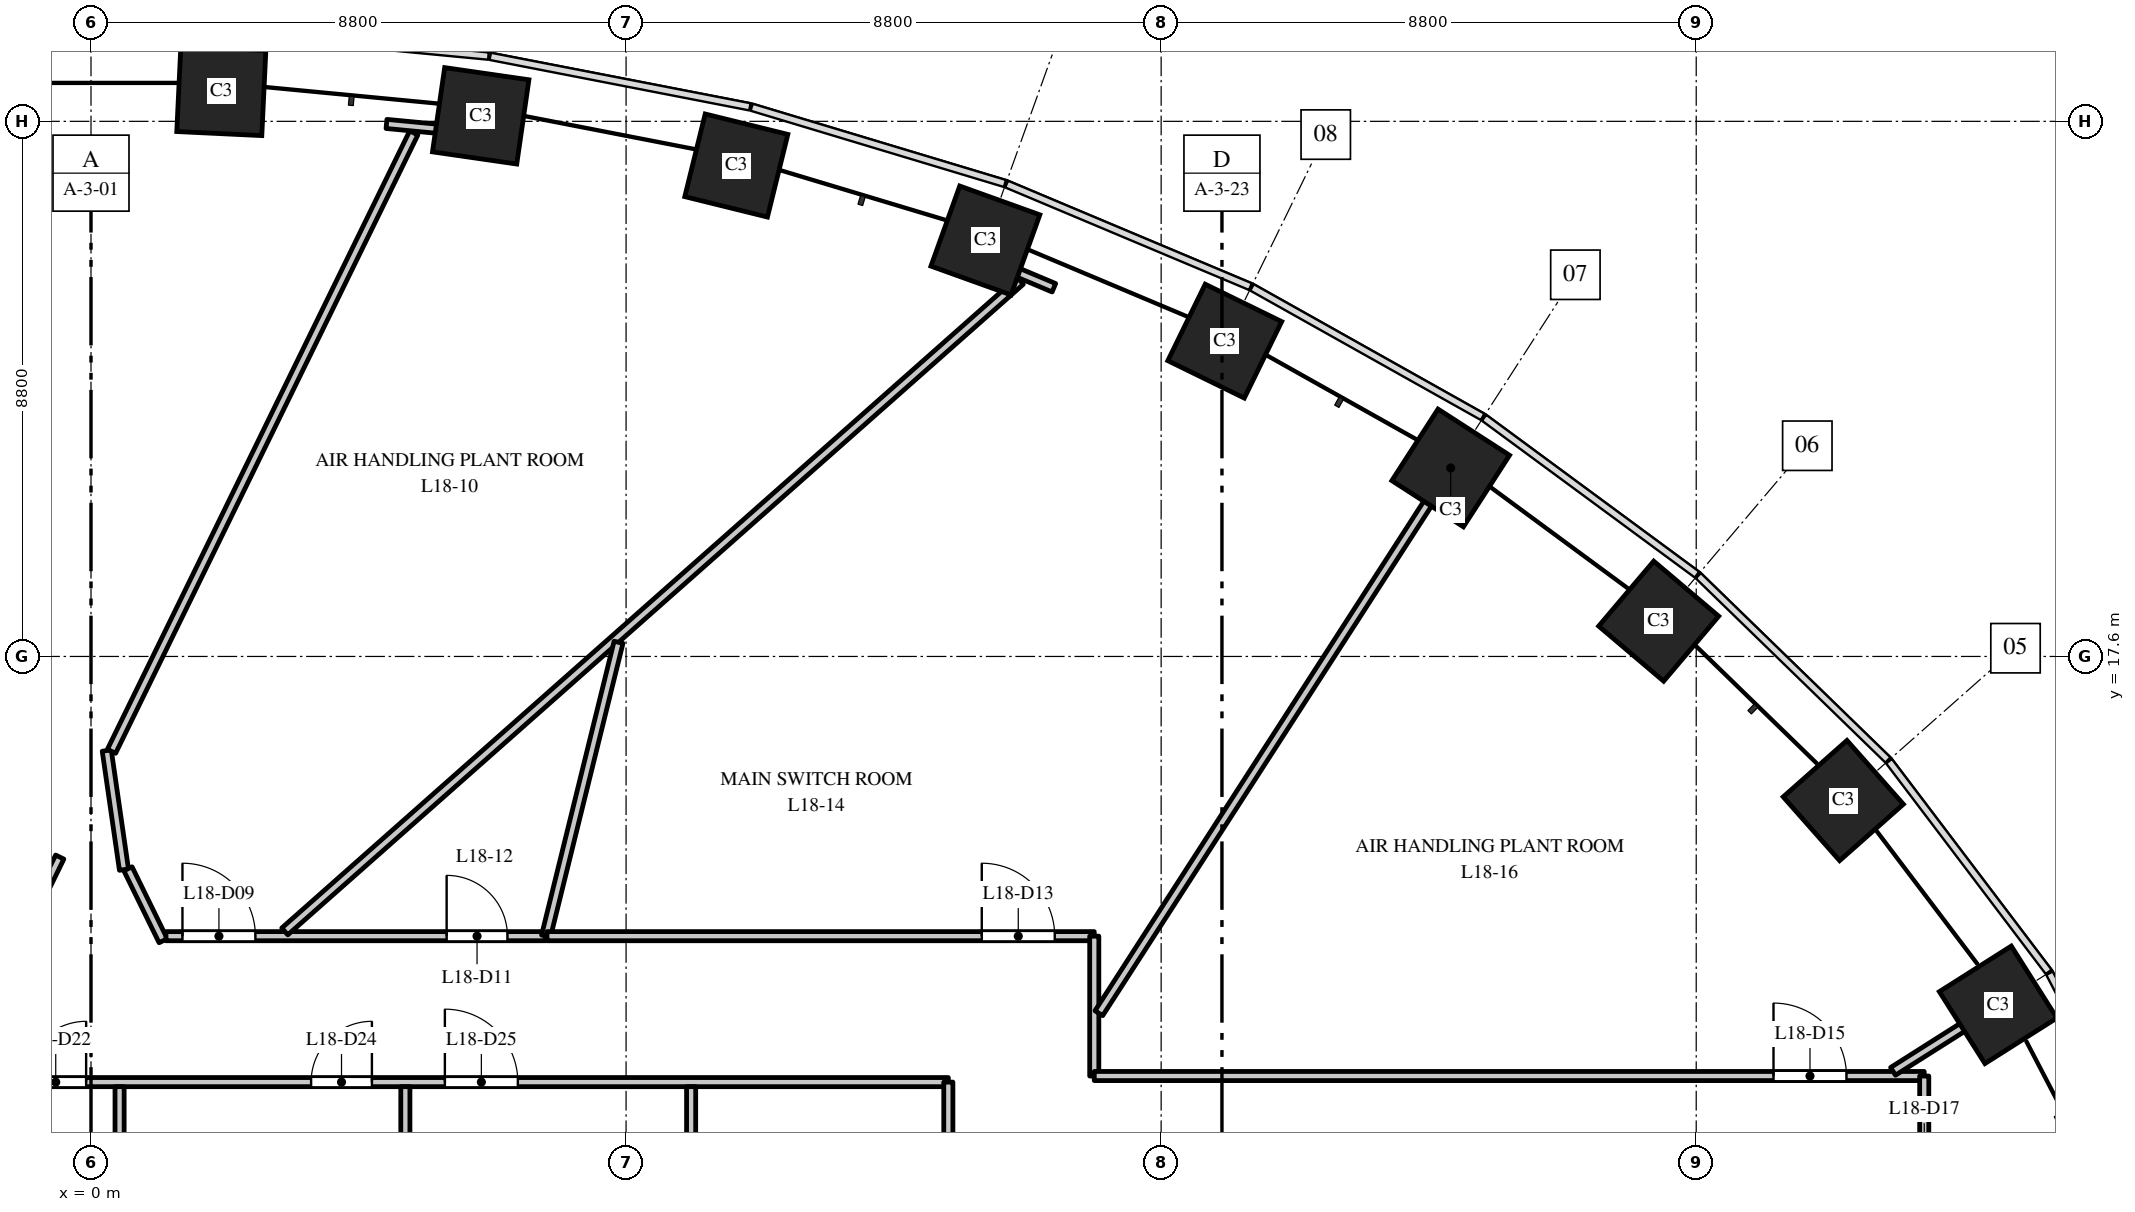
"""IFC4 building model, lengths in metres.
Left out: names, types, materials, properties, quantities, classifications, styles, units other than length and angle.
Written with IfcOpenShell. Run it as: python <this file> out.ifc"""

import sys

from ifc_helpers import new_model, si_unit, direction, frame, frame_2d, origin, origin_2d, place, context, subcontext, project, spatial, rectangle, extrude, element, fill, save


model = new_model("IFC4")
c1 = context("Model", 3, precision=1e-05, world=origin(), true_north=direction((0.0, 1.0)))
c2 = subcontext(c1, "Body", "Model", "MODEL_VIEW")
j1 = project(units=[si_unit("LENGTHUNIT", "METRE"), si_unit("PLANEANGLEUNIT", "RADIAN")], contexts=[c1])
p1 = place(None, origin())
s1 = spatial("IfcSite", under=j1, at=p1, CompositionType="ELEMENT")
p2 = place(p1, origin())
s2 = spatial("IfcBuilding", under=s1, at=p2, CompositionType="ELEMENT")
p3 = place(p2, frame((0.0, 0.0, 82.5)))
s3 = spatial("IfcBuildingStorey", under=s2, at=p3, CompositionType="ELEMENT", Elevation=82.5)
for number, where, z_axis, x_axis in (
    (1, (31.365, 11.871, 0.0), (0.0, 0.0, 1.0), (-0.535, 0.845, 0.0)),
    (2, (28.819, 15.23, 0.0), (0.0, 0.0, 1.0), (-0.663, 0.749, 0.0)),
    (3, (25.783, 18.18, 0.0), (0.0, 0.0, 1.0), (-0.763, 0.646, 0.0)),
    (4, (22.362, 20.7, 0.0), (0.0, 0.0, 1.0), (-0.84, 0.542, 0.0)),
    (5, (18.646, 22.785, 0.0), (0.0, 0.0, 1.0), (-0.898, 0.439, 0.0)),
    (6, (14.709, 24.441, 0.0), (0.0, 0.0, 1.0), (-0.941, 0.338, 0.0)),
    (7, (10.613, 25.674, 0.0), (0.0, 0.0, 1.0), (-0.971, 0.24, 0.0)),
    (8, (6.409, 26.491, 0.0), (0.0, 0.0, 1.0), (-0.99, 0.143, 0.0)),
    (9, (2.143, 26.898, 0.0), (0.0, 0.0, 1.0), (-0.999, 0.048, 0.0)),
):
    element("IfcColumn", number, at=place(p3, frame(where, z_axis=z_axis, x_axis=x_axis)), inside=s3, PredefinedType="COLUMN", context=c2, shape_type="SweptSolid", body=[
        extrude(rectangle(XDim=1.4, YDim=1.4, at=origin_2d()), origin(), (0.0, 0.0, 1.0), 5.5),
    ])
p4 = place(p3, frame((-14.1, 10.6, 0.0), z_axis=(0.0, 0.0, 1.0), x_axis=(1.0, 0.0, 0.0)))
e10 = element("IfcWall", 10, at=p4, inside=s3, PredefinedType="PARTITIONING", context=c2, shape_type="SweptSolid", body=[
    extrude(rectangle(XDim=28.2, YDim=0.15, at=frame_2d((14.1, 0.0))), origin(), (0.0, 0.0, 1.0), 4.35),
])
p5 = place(p4, frame((8.32, 0.0, 0.0)))
e11 = element("IfcOpeningElement", 11, at=p5, cuts=e10, PredefinedType="OPENING", context=c2, shape_type="SweptSolid", body=[
    extrude(rectangle(XDim=1.0, YDim=2.1, at=frame_2d((0.5, 1.05))), frame((0.0, 0.085, 0.0), z_axis=(0.0, -1.0, 0.0), x_axis=(1.0, 0.0, 0.0)), (0.0, 0.0, 1.0), 0.17),
])
p6 = place(p4, frame((13.02, 0.0, 0.0)))
e12 = element("IfcOpeningElement", 12, at=p6, cuts=e10, PredefinedType="OPENING", context=c2, shape_type="SweptSolid", body=[
    extrude(rectangle(XDim=1.0, YDim=2.1, at=frame_2d((0.5, 1.05))), frame((0.0, 0.085, 0.0), z_axis=(0.0, -1.0, 0.0), x_axis=(1.0, 0.0, 0.0)), (0.0, 0.0, 1.0), 0.17),
])
p7 = place(p4, frame((17.72, 0.0, 0.0)))
e13 = element("IfcOpeningElement", 13, at=p7, cuts=e10, PredefinedType="OPENING", context=c2, shape_type="SweptSolid", body=[
    extrude(rectangle(XDim=1.0, YDim=2.1, at=frame_2d((0.5, 1.05))), frame((0.0, 0.085, 0.0), z_axis=(0.0, -1.0, 0.0), x_axis=(1.0, 0.0, 0.0)), (0.0, 0.0, 1.0), 0.17),
])
p8 = place(p4, frame((19.92, 0.0, 0.0)))
e14 = element("IfcOpeningElement", 14, at=p8, cuts=e10, PredefinedType="OPENING", context=c2, shape_type="SweptSolid", body=[
    extrude(rectangle(XDim=1.2, YDim=2.1, at=frame_2d((0.6, 1.05))), frame((0.0, 0.085, 0.0), z_axis=(0.0, -1.0, 0.0), x_axis=(1.0, 0.0, 0.0)), (0.0, 0.0, 1.0), 0.17),
])
p9 = place(p3, frame((-1.113, 13.075, 0.0), z_axis=(0.0, 0.0, 1.0), x_axis=(0.439036850384, 0.898469055675, 0.0)))
e15 = element("IfcWall", 15, at=p9, inside=s3, PredefinedType="PARTITIONING", context=c2, shape_type="SweptSolid", body=[
    extrude(rectangle(XDim=1.365, YDim=0.15, at=frame_2d((0.682, 0.0))), origin(), (0.0, 0.0, 1.0), 4.35),
])
p10 = place(p3, frame((0.259, 16.052, 0.0), z_axis=(0.0, 0.0, 1.0), x_axis=(0.143027920195, -0.989718653984, 0.0)))
e16 = element("IfcWall", 16, at=p10, inside=s3, PredefinedType="PARTITIONING", context=c2, shape_type="SweptSolid", body=[
    extrude(rectangle(XDim=1.978, YDim=0.15, at=frame_2d((0.989, 0.0))), origin(), (0.0, 0.0, 1.0), 5.2),
])
p11 = place(p3, frame((0.337, 16.04, 0.0), z_axis=(0.0, 0.0, 1.0), x_axis=(0.439198527349, 0.898390034214, 0.0)))
e17 = element("IfcWall", 17, at=p11, inside=s3, PredefinedType="PARTITIONING", context=c2, shape_type="SweptSolid", body=[
    extrude(rectangle(XDim=11.32, YDim=0.15, at=frame_2d((5.66, 0.0))), origin(), (0.0, 0.0, 1.0), 4.4),
])
p12 = place(p3, frame((0.47, 7.469, 0.0), z_axis=(0.0, 0.0, 1.0), x_axis=(0.0, 1.0, 0.0)))
e18 = element("IfcWall", 18, at=p12, inside=s3, PredefinedType="PARTITIONING", context=c2, shape_type="SweptSolid", body=[
    extrude(rectangle(XDim=3.056, YDim=0.15, at=frame_2d((1.528, 0.0))), origin(), (0.0, 0.0, 1.0), 4.4),
])
p13 = place(p3, frame((0.608, 14.108, 0.0), z_axis=(0.0, 0.0, 1.0), x_axis=(0.439708780633, -0.898140405635, 0.0)))
e19 = element("IfcWall", 19, at=p13, inside=s3, PredefinedType="PARTITIONING", context=c2, shape_type="SweptSolid", body=[
    extrude(rectangle(XDim=1.317, YDim=0.15, at=frame_2d((0.658, 0.0))), origin(), (0.0, 0.0, 1.0), 5.2),
])
p14 = place(p3, frame((1.233, 13.0, 0.0), z_axis=(0.0, 0.0, 1.0), x_axis=(1.0, 0.0, 0.0)))
e20 = element("IfcWall", 20, at=p14, inside=s3, PredefinedType="PARTITIONING", context=c2, shape_type="SweptSolid", body=[
    extrude(rectangle(XDim=6.25, YDim=0.15, at=frame_2d((3.125, 0.0))), origin(), (0.0, 0.0, 1.0), 4.35),
])
p15 = place(p14, frame((0.271, 0.0, 0.0)))
e21 = element("IfcOpeningElement", 21, at=p15, cuts=e20, PredefinedType="OPENING", context=c2, shape_type="SweptSolid", body=[
    extrude(rectangle(XDim=1.2, YDim=2.1, at=frame_2d((0.6, 1.05))), frame((0.0, 0.085, 0.0), z_axis=(0.0, -1.0, 0.0), x_axis=(1.0, 0.0, 0.0)), (0.0, 0.0, 1.0), 0.17),
])
p16 = place(p14, frame((4.616, 0.0, 0.0)))
e22 = element("IfcOpeningElement", 22, at=p16, cuts=e20, PredefinedType="OPENING", context=c2, shape_type="SweptSolid", body=[
    extrude(rectangle(XDim=1.0, YDim=2.1, at=frame_2d((0.5, 1.05))), frame((0.0, 0.085, 0.0), z_axis=(0.0, -1.0, 0.0), x_axis=(1.0, 0.0, 0.0)), (0.0, 0.0, 1.0), 0.17),
])
p17 = place(p3, frame((3.187, 13.078, 0.0), z_axis=(0.0, 0.0, 1.0), x_axis=(0.749072740897, 0.662487757506, 0.0)))
e23 = element("IfcWall", 23, at=p17, inside=s3, PredefinedType="PARTITIONING", context=c2, shape_type="SweptSolid", body=[
    extrude(rectangle(XDim=16.148, YDim=0.15, at=frame_2d((8.074, 0.0))), origin(), (0.0, 0.0, 1.0), 4.35),
])
p18 = place(p3, frame((5.17, 6.105, 0.0), z_axis=(0.0, 0.0, 1.0), x_axis=(0.0, 1.0, 0.0)))
e24 = element("IfcWall", 24, at=p18, inside=s3, PredefinedType="PARTITIONING", context=c2, shape_type="SweptSolid", body=[
    extrude(rectangle(XDim=4.42, YDim=0.15, at=frame_2d((2.21, 0.0))), origin(), (0.0, 0.0, 1.0), 4.35),
])
p19 = place(p3, frame((7.483, 13.0, 0.0), z_axis=(0.0, 0.0, 1.0), x_axis=(0.239672770915, 0.970853728881, 0.0)))
e25 = element("IfcWall", 25, at=p19, inside=s3, PredefinedType="PARTITIONING", context=c2, shape_type="SweptSolid", body=[
    extrude(rectangle(XDim=4.978, YDim=0.15, at=frame_2d((2.489, 0.0))), origin(), (0.0, 0.0, 1.0), 5.2),
])
p20 = place(p3, frame((7.499, 13.0, 0.0), z_axis=(0.0, 0.0, 1.0), x_axis=(1.0, 0.0, 0.0)))
e26 = element("IfcWall", 26, at=p20, inside=s3, PredefinedType="PARTITIONING", context=c2, shape_type="SweptSolid", body=[
    extrude(rectangle(XDim=9.001, YDim=0.15, at=frame_2d((4.5, 0.0))), origin(), (0.0, 0.0, 1.0), 4.35),
])
p21 = place(p20, frame((7.151, 0.0, 0.0)))
e27 = element("IfcOpeningElement", 27, at=p21, cuts=e26, PredefinedType="OPENING", context=c2, shape_type="SweptSolid", body=[
    extrude(rectangle(XDim=1.2, YDim=2.1, at=frame_2d((0.6, 1.05))), frame((0.0, 0.085, 0.0), z_axis=(0.0, -1.0, 0.0), x_axis=(1.0, 0.0, 0.0)), (0.0, 0.0, 1.0), 0.17),
])
p22 = place(p3, frame((9.87, -10.525, 0.0), z_axis=(0.0, 0.0, 1.0), x_axis=(0.0, 1.0, 0.0)))
e28 = element("IfcWall", 28, at=p22, inside=s3, PredefinedType="PARTITIONING", context=c2, shape_type="SweptSolid", body=[
    extrude(rectangle(XDim=21.05, YDim=0.15, at=frame_2d((10.525, 0.0))), origin(), (0.0, 0.0, 1.0), 4.25),
])
p23 = place(p3, frame((14.1, -10.6, 0.0), z_axis=(0.0, 0.0, 1.0), x_axis=(0.0, 1.0, 0.0)))
e29 = element("IfcWall", 29, at=p23, inside=s3, PredefinedType="PARTITIONING", context=c2, shape_type="SweptSolid", body=[
    extrude(rectangle(XDim=21.2, YDim=0.15, at=frame_2d((10.6, 0.0))), origin(), (0.0, 0.0, 1.0), 4.25),
])
p24 = place(p23, frame((0.6, 0.0, 0.0)))
e30 = element("IfcOpeningElement", 30, at=p24, cuts=e29, PredefinedType="OPENING", context=c2, shape_type="SweptSolid", body=[
    extrude(rectangle(XDim=1.2, YDim=2.1, at=frame_2d((0.6, 1.05))), frame((0.0, 0.085, 0.0), z_axis=(0.0, -1.0, 0.0), x_axis=(1.0, 0.0, 0.0)), (0.0, 0.0, 1.0), 0.17),
])
p25 = place(p3, frame((16.5, 10.7, 0.0), z_axis=(0.0, 0.0, 1.0), x_axis=(0.0, 1.0, 0.0)))
e31 = element("IfcWall", 31, at=p25, inside=s3, PredefinedType="PARTITIONING", context=c2, shape_type="SweptSolid", body=[
    extrude(rectangle(XDim=2.3, YDim=0.15, at=frame_2d((1.15, 0.0))), origin(), (0.0, 0.0, 1.0), 5.2),
])
p26 = place(p3, frame((16.5, 10.7, 0.0), z_axis=(0.0, 0.0, 1.0), x_axis=(1.0, 0.0, 0.0)))
e32 = element("IfcWall", 32, at=p26, inside=s3, PredefinedType="PARTITIONING", context=c2, shape_type="SweptSolid", body=[
    extrude(rectangle(XDim=13.65, YDim=0.15, at=frame_2d((6.825, 0.0))), origin(), (0.0, 0.0, 1.0), 4.25),
])
p27 = place(p26, frame((11.171, 0.0, 0.0)))
e33 = element("IfcOpeningElement", 33, at=p27, cuts=e32, PredefinedType="OPENING", context=c2, shape_type="SweptSolid", body=[
    extrude(rectangle(XDim=1.2, YDim=2.1, at=frame_2d((0.6, 1.05))), frame((0.0, 0.085, 0.0), z_axis=(0.0, -1.0, 0.0), x_axis=(1.0, 0.0, 0.0)), (0.0, 0.0, 1.0), 0.17),
])
p28 = place(p3, frame((16.575, 11.733, 0.0), z_axis=(0.0, 0.0, 1.0), x_axis=(0.542237854087, 0.840225035092, 0.0)))
e34 = element("IfcWall", 34, at=p28, inside=s3, PredefinedType="PARTITIONING", context=c2, shape_type="SweptSolid", body=[
    extrude(rectangle(XDim=10.772, YDim=0.15, at=frame_2d((5.386, 0.0))), origin(), (0.0, 0.0, 1.0), 5.2),
])
p29 = place(p3, frame((29.637, 10.777, 0.0), z_axis=(0.0, 0.0, 1.0), x_axis=(0.844747041197, 0.535165802709, 0.0)))
e35 = element("IfcWall", 35, at=p29, inside=s3, PredefinedType="PARTITIONING", context=c2, shape_type="SweptSolid", body=[
    extrude(rectangle(XDim=2.145, YDim=0.15, at=frame_2d((1.073, 0.0))), origin(), (0.0, 0.0, 1.0), 5.2),
])
p30 = place(p3, frame((30.15, 8.5, 0.0), z_axis=(0.0, 0.0, 1.0), x_axis=(0.0, 1.0, 0.0)))
e36 = element("IfcWall", 36, at=p30, inside=s3, PredefinedType="PARTITIONING", context=c2, shape_type="SweptSolid", body=[
    extrude(rectangle(XDim=2.2, YDim=0.15, at=frame_2d((1.1, 0.0))), origin(), (0.0, 0.0, 1.0), 5.2),
])
p31 = place(p30, frame((0.15, 0.0, 0.0)))
e37 = element("IfcOpeningElement", 37, at=p31, cuts=e36, PredefinedType="OPENING", context=c2, shape_type="SweptSolid", body=[
    extrude(rectangle(XDim=1.0, YDim=2.1, at=frame_2d((0.5, 1.05))), frame((0.0, 0.085, 0.0), z_axis=(0.0, -1.0, 0.0), x_axis=(1.0, 0.0, 0.0)), (0.0, 0.0, 1.0), 0.17),
])
p32 = place(p3, frame((5.705, 26.277, 0.0), z_axis=(0.0, 0.0, 1.0), x_axis=(-0.995485124943, 0.094917680217, 0.0)))
e38 = element("IfcWall", 38, at=p32, inside=s3, PredefinedType="PARTITIONING", context=c2, shape_type="SweptSolid", body=[
    extrude(rectangle(XDim=0.849, YDim=0.15, at=frame_2d((0.424, 0.0))), origin(), (0.0, 0.0, 1.0), 5.2),
])
p33 = place(p3, frame((15.836, 23.663, 0.0), z_axis=(0.0, 0.0, 1.0), x_axis=(-0.921788792794, 0.387692431549, 0.0)))
e39 = element("IfcWall", 39, at=p33, inside=s3, PredefinedType="PARTITIONING", context=c2, shape_type="SweptSolid", body=[
    extrude(rectangle(XDim=0.659, YDim=0.15, at=frame_2d((0.329, 0.0))), origin(), (0.0, 0.0, 1.0), 5.2),
])
p34 = place(p15, origin())
e40 = element("IfcDoor", 40, at=p34, inside=s3, OperationType="SINGLE_SWING_LEFT", PredefinedType="DOOR", context=c2, shape_type="SweptSolid", body=[
    extrude(rectangle(XDim=1.2, YDim=2.1, at=frame_2d((0.6, 1.05))), frame((0.0, 0.025, 0.0), z_axis=(0.0, -1.0, 0.0), x_axis=(1.0, 0.0, 0.0)), (0.0, 0.0, 1.0), 0.05),
])
fill(e21, e40)
p35 = place(p16, origin())
e41 = element("IfcDoor", 41, at=p35, inside=s3, OperationType="SINGLE_SWING_LEFT", PredefinedType="DOOR", context=c2, shape_type="SweptSolid", body=[
    extrude(rectangle(XDim=1.0, YDim=2.1, at=frame_2d((0.5, 1.05))), frame((0.0, 0.025, 0.0), z_axis=(0.0, -1.0, 0.0), x_axis=(1.0, 0.0, 0.0)), (0.0, 0.0, 1.0), 0.05),
])
fill(e22, e41)
p36 = place(p21, origin())
e42 = element("IfcDoor", 42, at=p36, inside=s3, OperationType="SINGLE_SWING_LEFT", PredefinedType="DOOR", context=c2, shape_type="SweptSolid", body=[
    extrude(rectangle(XDim=1.2, YDim=2.1, at=frame_2d((0.6, 1.05))), frame((0.0, 0.025, 0.0), z_axis=(0.0, -1.0, 0.0), x_axis=(1.0, 0.0, 0.0)), (0.0, 0.0, 1.0), 0.05),
])
fill(e27, e42)
p37 = place(p27, origin())
e43 = element("IfcDoor", 43, at=p37, inside=s3, OperationType="SINGLE_SWING_LEFT", PredefinedType="DOOR", context=c2, shape_type="SweptSolid", body=[
    extrude(rectangle(XDim=1.2, YDim=2.1, at=frame_2d((0.6, 1.05))), frame((0.0, 0.025, 0.0), z_axis=(0.0, -1.0, 0.0), x_axis=(1.0, 0.0, 0.0)), (0.0, 0.0, 1.0), 0.05),
])
fill(e33, e43)
p38 = place(p6, origin())
e44 = element("IfcDoor", 44, at=p38, inside=s3, OperationType="SINGLE_SWING_RIGHT", PredefinedType="DOOR", context=c2, shape_type="SweptSolid", body=[
    extrude(rectangle(XDim=1.0, YDim=2.1, at=frame_2d((0.5, 1.05))), frame((0.0, 0.025, 0.0), z_axis=(0.0, -1.0, 0.0), x_axis=(1.0, 0.0, 0.0)), (0.0, 0.0, 1.0), 0.05),
])
fill(e12, e44)
p39 = place(p7, origin())
e45 = element("IfcDoor", 45, at=p39, inside=s3, OperationType="SINGLE_SWING_RIGHT", PredefinedType="DOOR", context=c2, shape_type="SweptSolid", body=[
    extrude(rectangle(XDim=1.0, YDim=2.1, at=frame_2d((0.5, 1.05))), frame((0.0, 0.025, 0.0), z_axis=(0.0, -1.0, 0.0), x_axis=(1.0, 0.0, 0.0)), (0.0, 0.0, 1.0), 0.05),
])
fill(e13, e45)
p40 = place(p8, origin())
e46 = element("IfcDoor", 46, at=p40, inside=s3, OperationType="SINGLE_SWING_LEFT", PredefinedType="DOOR", context=c2, shape_type="SweptSolid", body=[
    extrude(rectangle(XDim=1.2, YDim=2.1, at=frame_2d((0.6, 1.05))), frame((0.0, 0.025, 0.0), z_axis=(0.0, -1.0, 0.0), x_axis=(1.0, 0.0, 0.0)), (0.0, 0.0, 1.0), 0.05),
])
fill(e14, e46)
save(model, sys.argv[1])
